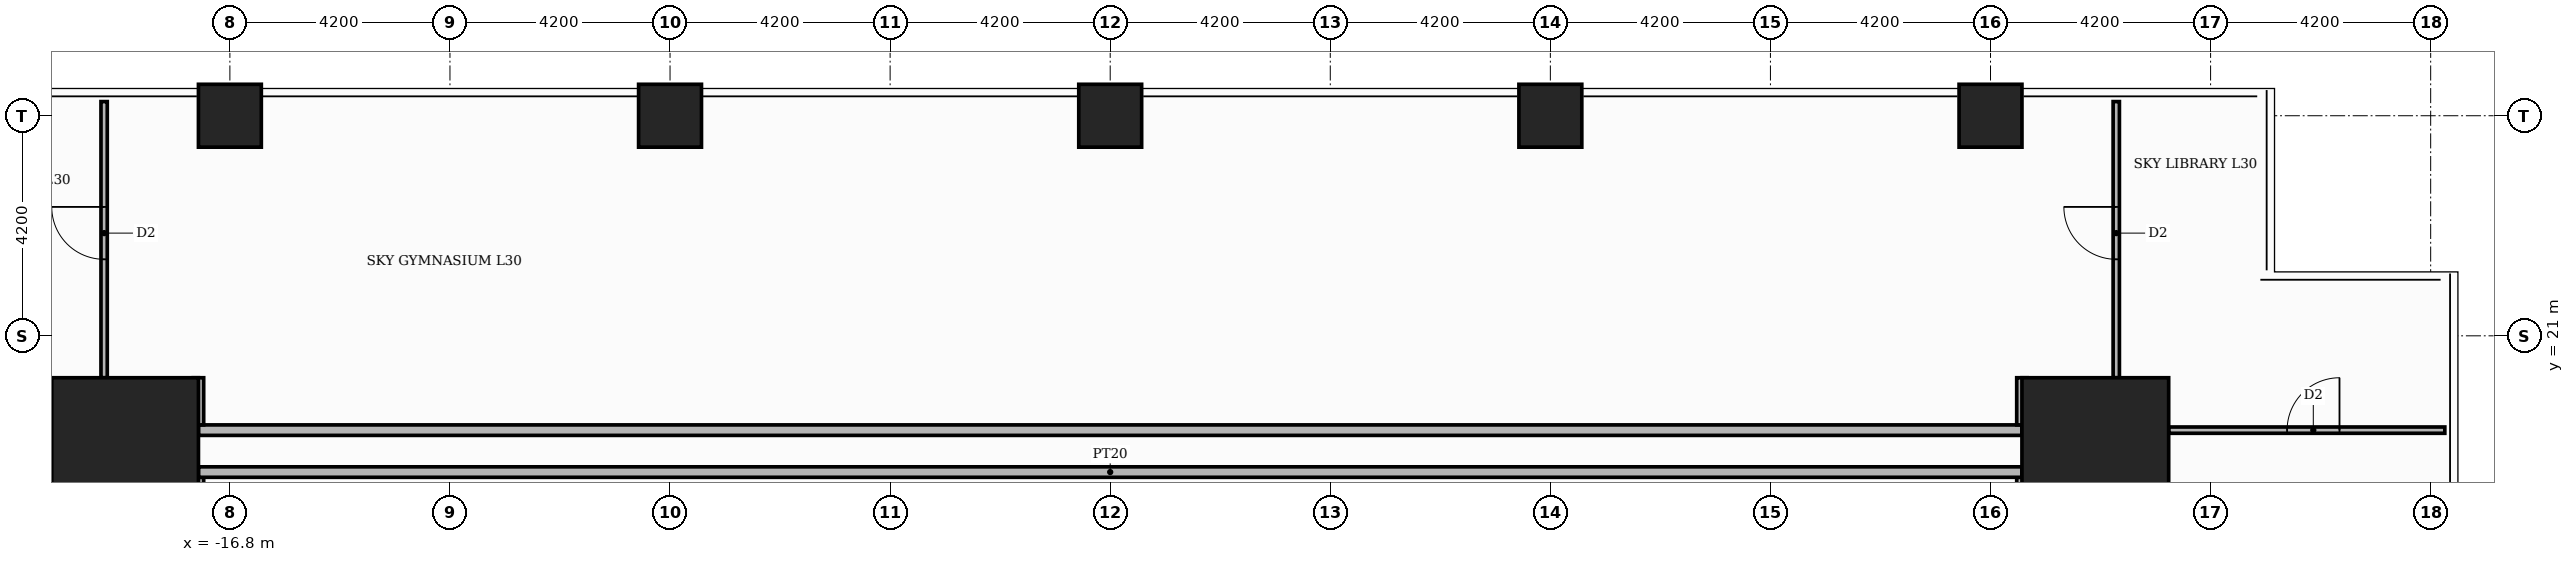
"""IFC4 building model, lengths in metres.
Left out: names, types, materials, properties, quantities, classifications, styles, units other than length and angle.
Written with IfcOpenShell. Run it as: python <this file> out.ifc"""

import sys

from ifc_helpers import new_model, si_unit, direction, frame, frame_2d, origin, origin_2d, place, context, subcontext, project, spatial, rectangle, extrude, element, fill, save


model = new_model("IFC4")
c1 = context("Model", 3, precision=1e-05, world=origin(), true_north=direction((0.0, 1.0)))
c2 = subcontext(c1, "Body", "Model", "MODEL_VIEW")
j1 = project(units=[si_unit("LENGTHUNIT", "METRE"), si_unit("PLANEANGLEUNIT", "RADIAN")], contexts=[c1])
p1 = place(None, origin())
s1 = spatial("IfcSite", under=j1, at=p1, CompositionType="ELEMENT")
p2 = place(p1, origin())
s2 = spatial("IfcBuilding", under=s1, at=p2, CompositionType="ELEMENT")
p3 = place(p2, frame((0.0, 0.0, 126.0)))
s3 = spatial("IfcBuildingStorey", under=s2, at=p3, CompositionType="ELEMENT", Elevation=126.0)
for number, where, z_axis, x_axis in (
    (1, (18.8, 18.8, 0.0), (0.0, 0.0, 1.0), (1.0, 0.0, 0.0)),
    (2, (-18.8, 18.8, 0.0), (0.0, 0.0, 1.0), (1.0, 0.0, 0.0)),
):
    element("IfcColumn", number, at=place(p3, frame(where, z_axis=z_axis, x_axis=x_axis)), inside=s3, PredefinedType="COLUMN", context=c2, shape_type="SweptSolid", body=[
        extrude(rectangle(XDim=2.8, YDim=2.8, at=origin_2d()), origin(), (0.0, 0.0, 1.0), 7.8),
    ])
for number, where, z_axis, x_axis in (
    (3, (0.0, 25.2, 0.0), (0.0, 0.0, 1.0), (1.0, 0.0, 0.0)),
    (4, (-8.4, 25.2, 0.0), (0.0, 0.0, 1.0), (1.0, 0.0, 0.0)),
    (5, (-16.8, 25.2, 0.0), (0.0, 0.0, 1.0), (1.0, 0.0, 0.0)),
    (6, (8.4, 25.2, 0.0), (0.0, 0.0, 1.0), (1.0, 0.0, 0.0)),
    (7, (16.8, 25.2, 0.0), (0.0, 0.0, 1.0), (1.0, 0.0, 0.0)),
):
    element("IfcColumn", number, at=place(p3, frame(where, z_axis=z_axis, x_axis=x_axis)), inside=s3, PredefinedType="COLUMN", context=c2, shape_type="SweptSolid", body=[
        extrude(rectangle(XDim=1.2, YDim=1.2, at=origin_2d()), origin(), (0.0, 0.0, 1.0), 7.8),
    ])
for number, where, z_axis, x_axis in (
    (8, (-17.4, 17.5, 0.0), (0.0, 0.0, 1.0), (0.0, 1.0, 0.0)),
    (9, (17.4, 17.5, 0.0), (0.0, 0.0, 1.0), (0.0, 1.0, 0.0)),
):
    element("IfcWall", number, at=place(p3, frame(where, z_axis=z_axis, x_axis=x_axis)), inside=s3, PredefinedType="PARTITIONING", context=c2, shape_type="SweptSolid", body=[
        extrude(rectangle(XDim=0.8, YDim=0.2, at=frame_2d((0.4, 0.0))), origin(), (0.0, 0.0, 1.0), 7.38),
    ])
for number, where, z_axis, x_axis in (
    (10, (-17.4, 18.4, 0.0), (0.0, 0.0, 1.0), (1.0, 0.0, 0.0)),
    (11, (-17.4, 19.2, 0.0), (0.0, 0.0, 1.0), (1.0, 0.0, 0.0)),
):
    element("IfcWall", number, at=place(p3, frame(where, z_axis=z_axis, x_axis=x_axis)), inside=s3, PredefinedType="PARTITIONING", context=c2, shape_type="SweptSolid", body=[
        extrude(rectangle(XDim=34.8, YDim=0.2, at=frame_2d((17.4, 0.0))), origin(), (0.0, 0.0, 1.0), 7.38),
    ])
p4 = place(p3, frame((20.2, 19.2, 0.0), z_axis=(0.0, 0.0, 1.0), x_axis=(1.0, 0.0, 0.0)))
e12 = element("IfcWall", 12, at=p4, inside=s3, PredefinedType="PARTITIONING", context=c2, shape_type="SweptSolid", body=[
    extrude(rectangle(XDim=5.27, YDim=0.12, at=frame_2d((2.635, 0.0))), origin(), (0.0, 0.0, 1.0), 7.38),
])
p5 = place(p4, frame((2.26, 0.0, 0.0)))
e13 = element("IfcOpeningElement", 13, at=p5, cuts=e12, PredefinedType="OPENING", context=c2, shape_type="SweptSolid", body=[
    extrude(rectangle(XDim=1.0, YDim=2.1, at=frame_2d((0.5, 1.05))), frame((0.0, 0.07, 0.0), z_axis=(0.0, -1.0, 0.0), x_axis=(1.0, 0.0, 0.0)), (0.0, 0.0, 1.0), 0.14),
])
for number, where, z_axis, x_axis in (
    (14, (-17.4, 19.3, 0.0), (0.0, 0.0, 1.0), (0.0, 1.0, 0.0)),
    (15, (17.4, 19.3, 0.0), (0.0, 0.0, 1.0), (0.0, 1.0, 0.0)),
):
    element("IfcWall", number, at=place(p3, frame(where, z_axis=z_axis, x_axis=x_axis)), inside=s3, PredefinedType="PARTITIONING", context=c2, shape_type="SweptSolid", body=[
        extrude(rectangle(XDim=0.9, YDim=0.2, at=frame_2d((0.45, 0.0))), origin(), (0.0, 0.0, 1.0), 7.38),
    ])
p6 = place(p3, frame((-19.2, 20.2, 0.0), z_axis=(0.0, 0.0, 1.0), x_axis=(0.0, 1.0, 0.0)))
e16 = element("IfcWall", 16, at=p6, inside=s3, PredefinedType="PARTITIONING", context=c2, shape_type="SweptSolid", body=[
    extrude(rectangle(XDim=5.27, YDim=0.12, at=frame_2d((2.635, 0.0))), origin(), (0.0, 0.0, 1.0), 7.38),
])
p7 = place(p6, frame((2.26, 0.0, 0.0)))
e17 = element("IfcOpeningElement", 17, at=p7, cuts=e16, PredefinedType="OPENING", context=c2, shape_type="SweptSolid", body=[
    extrude(rectangle(XDim=1.0, YDim=2.1, at=frame_2d((0.5, 1.05))), frame((0.0, 0.07, 0.0), z_axis=(0.0, -1.0, 0.0), x_axis=(1.0, 0.0, 0.0)), (0.0, 0.0, 1.0), 0.14),
])
p8 = place(p3, frame((19.2, 20.2, 0.0), z_axis=(0.0, 0.0, 1.0), x_axis=(0.0, 1.0, 0.0)))
e18 = element("IfcWall", 18, at=p8, inside=s3, PredefinedType="PARTITIONING", context=c2, shape_type="SweptSolid", body=[
    extrude(rectangle(XDim=5.27, YDim=0.12, at=frame_2d((2.635, 0.0))), origin(), (0.0, 0.0, 1.0), 7.38),
])
p9 = place(p8, frame((2.26, 0.0, 0.0)))
e19 = element("IfcOpeningElement", 19, at=p9, cuts=e18, PredefinedType="OPENING", context=c2, shape_type="SweptSolid", body=[
    extrude(rectangle(XDim=1.0, YDim=2.1, at=frame_2d((0.5, 1.05))), frame((0.0, 0.07, 0.0), z_axis=(0.0, -1.0, 0.0), x_axis=(1.0, 0.0, 0.0)), (0.0, 0.0, 1.0), 0.14),
])
p10 = place(p5, origin())
e20 = element("IfcDoor", 20, at=p10, inside=s3, OperationType="SINGLE_SWING_RIGHT", PredefinedType="DOOR", context=c2, shape_type="SweptSolid", body=[
    extrude(rectangle(XDim=1.0, YDim=2.1, at=frame_2d((0.5, 1.05))), frame((0.0, 0.025, 0.0), z_axis=(0.0, -1.0, 0.0), x_axis=(1.0, 0.0, 0.0)), (0.0, 0.0, 1.0), 0.05),
])
fill(e13, e20)
p11 = place(p9, origin())
e21 = element("IfcDoor", 21, at=p11, inside=s3, OperationType="SINGLE_SWING_RIGHT", PredefinedType="DOOR", context=c2, shape_type="SweptSolid", body=[
    extrude(rectangle(XDim=1.0, YDim=2.1, at=frame_2d((0.5, 1.05))), frame((0.0, 0.025, 0.0), z_axis=(0.0, -1.0, 0.0), x_axis=(1.0, 0.0, 0.0)), (0.0, 0.0, 1.0), 0.05),
])
fill(e19, e21)
p12 = place(p7, origin())
e22 = element("IfcDoor", 22, at=p12, inside=s3, OperationType="SINGLE_SWING_RIGHT", PredefinedType="DOOR", context=c2, shape_type="SweptSolid", body=[
    extrude(rectangle(XDim=1.0, YDim=2.1, at=frame_2d((0.5, 1.05))), frame((0.0, 0.025, 0.0), z_axis=(0.0, -1.0, 0.0), x_axis=(1.0, 0.0, 0.0)), (0.0, 0.0, 1.0), 0.05),
])
fill(e17, e22)
save(model, sys.argv[1])
